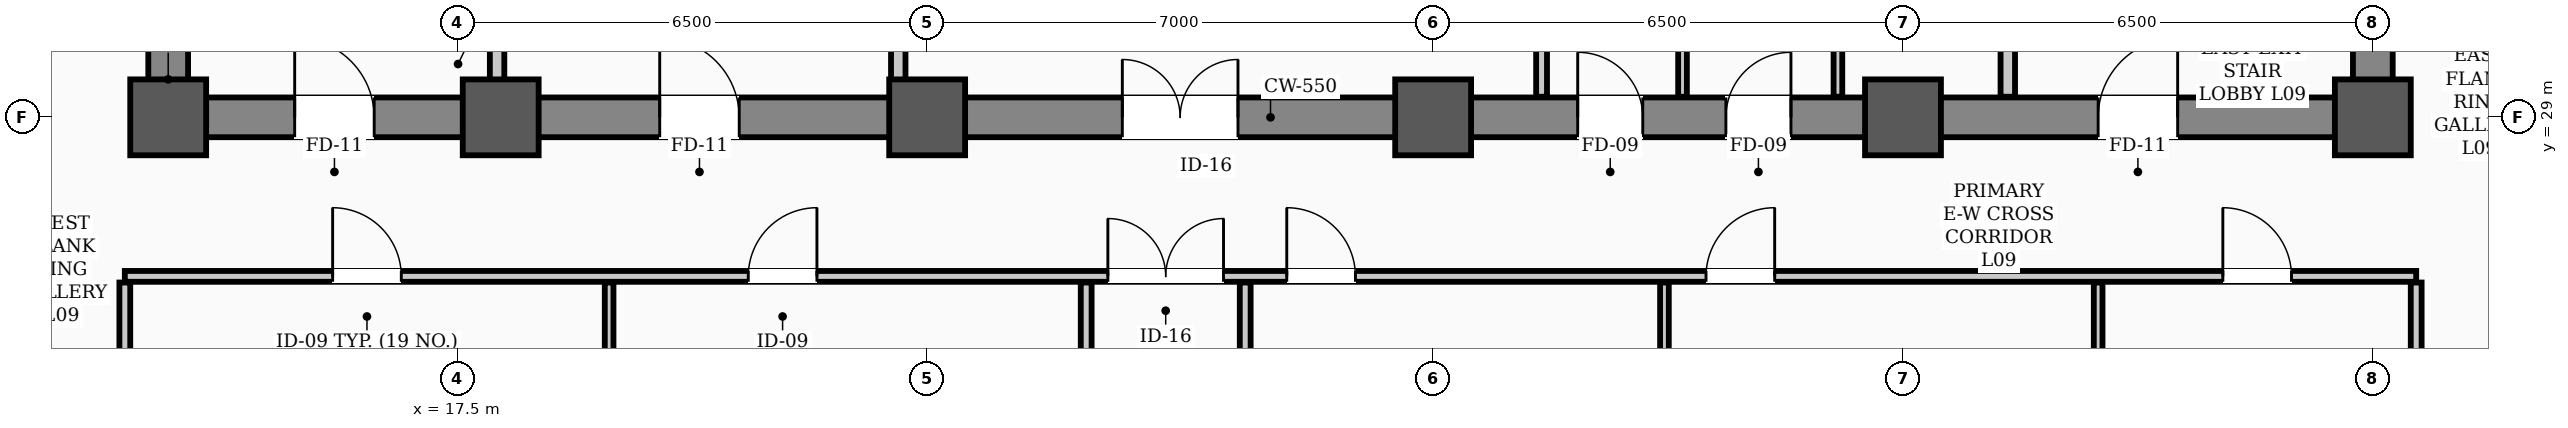
"""IFC4 building model, lengths in metres.
Left out: names, types, materials, properties, quantities, classifications, styles, units other than length and angle.
Written with IfcOpenShell. Run it as: python <this file> out.ifc"""

import sys

from ifc_helpers import new_model, si_unit, direction, frame, frame_2d, origin, origin_2d, place, context, subcontext, project, spatial, rectangle, hollow_rectangle, extrude, element, fill, save


model = new_model("IFC4")
c1 = context("Model", 3, precision=1e-05, world=origin(), true_north=direction((0.0, 1.0)))
c2 = subcontext(c1, "Body", "Model", "MODEL_VIEW")
j1 = project(units=[si_unit("LENGTHUNIT", "METRE"), si_unit("PLANEANGLEUNIT", "RADIAN")], contexts=[c1])
p1 = place(None, origin())
s1 = spatial("IfcSite", under=j1, at=p1, CompositionType="ELEMENT")
p2 = place(p1, origin())
s2 = spatial("IfcBuilding", under=s1, at=p2, CompositionType="ELEMENT")
p3 = place(p2, frame((0.0, 0.0, 38.2)))
s3 = spatial("IfcBuildingStorey", under=s2, at=p3, CompositionType="ELEMENT", Elevation=38.2)
for number, where, z_axis, x_axis in (
    (1, (13.5, 29.0, 0.0), (0.0, 0.0, 1.0), (1.0, 0.0, 0.0)),
    (2, (18.1, 29.0, 0.0), (0.0, 0.0, 1.0), (1.0, 0.0, 0.0)),
    (3, (24.0, 29.0, 0.0), (0.0, 0.0, 1.0), (1.0, 0.0, 0.0)),
    (4, (31.0, 29.0, 0.0), (0.0, 0.0, 1.0), (1.0, 0.0, 0.0)),
    (5, (37.5, 29.0, 0.0), (0.0, 0.0, 1.0), (1.0, 0.0, 0.0)),
    (6, (44.0, 29.0, 0.0), (0.0, 0.0, 1.0), (1.0, 0.0, 0.0)),
):
    element("IfcColumn", number, at=place(p3, frame(where, z_axis=z_axis, x_axis=x_axis)), inside=s3, PredefinedType="COLUMN", context=c2, shape_type="SweptSolid", body=[
        extrude(hollow_rectangle(XDim=1.05, YDim=1.05, WallThickness=0.038, InnerFilletRadius=0.019, OuterFilletRadius=0.057, at=origin_2d()), origin(), (0.0, 0.0, 1.0), 3.9),
    ])
p4 = place(p3, frame((13.5, 29.0, 0.0), z_axis=(0.0, 0.0, 1.0), x_axis=(1.0, 0.0, 0.0)))
e7 = element("IfcWall", 7, at=p4, inside=s3, PredefinedType="SHEAR", context=c2, shape_type="SweptSolid", body=[
    extrude(rectangle(XDim=30.5, YDim=0.55, at=frame_2d((15.25, 0.0))), origin(), (0.0, 0.0, 1.0), 3.72),
])
p5 = place(p4, frame((1.75, 0.0, 0.0)))
e8 = element("IfcOpeningElement", 8, at=p5, cuts=e7, PredefinedType="OPENING", context=c2, shape_type="SweptSolid", body=[
    extrude(rectangle(XDim=1.1, YDim=2.08, at=frame_2d((0.55, 1.04))), frame((0.0, 0.285, 0.0), z_axis=(0.0, -1.0, 0.0), x_axis=(1.0, 0.0, 0.0)), (0.0, 0.0, 1.0), 0.57),
])
p6 = place(p4, frame((26.7, 0.0, 0.0)))
e9 = element("IfcOpeningElement", 9, at=p6, cuts=e7, PredefinedType="OPENING", context=c2, shape_type="SweptSolid", body=[
    extrude(rectangle(XDim=1.1, YDim=2.08, at=frame_2d((0.55, 1.04))), frame((0.0, 0.285, 0.0), z_axis=(0.0, -1.0, 0.0), x_axis=(1.0, 0.0, 0.0)), (0.0, 0.0, 1.0), 0.57),
])
p7 = place(p4, frame((6.8, 0.0, 0.0)))
e10 = element("IfcOpeningElement", 10, at=p7, cuts=e7, PredefinedType="OPENING", context=c2, shape_type="SweptSolid", body=[
    extrude(rectangle(XDim=1.1, YDim=2.08, at=frame_2d((0.55, 1.04))), frame((0.0, 0.285, 0.0), z_axis=(0.0, -1.0, 0.0), x_axis=(1.0, 0.0, 0.0)), (0.0, 0.0, 1.0), 0.57),
])
p8 = place(p4, frame((13.2, 0.0, 0.0)))
e11 = element("IfcOpeningElement", 11, at=p8, cuts=e7, PredefinedType="OPENING", context=c2, shape_type="SweptSolid", body=[
    extrude(rectangle(XDim=1.6, YDim=2.08, at=frame_2d((0.8, 1.04))), frame((0.0, 0.285, 0.0), z_axis=(0.0, -1.0, 0.0), x_axis=(1.0, 0.0, 0.0)), (0.0, 0.0, 1.0), 0.57),
])
p9 = place(p4, frame((19.5, 0.0, 0.0)))
e12 = element("IfcOpeningElement", 12, at=p9, cuts=e7, PredefinedType="OPENING", context=c2, shape_type="SweptSolid", body=[
    extrude(rectangle(XDim=0.9, YDim=2.08, at=frame_2d((0.45, 1.04))), frame((0.0, 0.285, 0.0), z_axis=(0.0, -1.0, 0.0), x_axis=(1.0, 0.0, 0.0)), (0.0, 0.0, 1.0), 0.57),
])
p10 = place(p4, frame((21.55, 0.0, 0.0)))
e13 = element("IfcOpeningElement", 13, at=p10, cuts=e7, PredefinedType="OPENING", context=c2, shape_type="SweptSolid", body=[
    extrude(rectangle(XDim=0.9, YDim=2.08, at=frame_2d((0.45, 1.04))), frame((0.0, 0.285, 0.0), z_axis=(0.0, -1.0, 0.0), x_axis=(1.0, 0.0, 0.0)), (0.0, 0.0, 1.0), 0.57),
])
for number, where, z_axis, x_axis in (
    (14, (13.5, 29.35, 0.0), (0.0, 0.0, 1.0), (0.0, 1.0, 0.0)),
    (15, (44.0, 29.35, 0.0), (0.0, 0.0, 1.0), (0.0, 1.0, 0.0)),
):
    element("IfcWall", number, at=place(p3, frame(where, z_axis=z_axis, x_axis=x_axis)), inside=s3, PredefinedType="SHEAR", context=c2, shape_type="SweptSolid", body=[
        extrude(rectangle(XDim=8.6, YDim=0.55, at=frame_2d((4.3, 0.0))), origin(), (0.0, 0.0, 1.0), 3.72),
    ])
p11 = place(p3, frame((12.9, 26.8, 0.0), z_axis=(0.0, 0.0, 1.0), x_axis=(1.0, 0.0, 0.0)))
e16 = element("IfcWall", 16, at=p11, inside=s3, PredefinedType="PARTITIONING", context=c2, shape_type="SweptSolid", body=[
    extrude(rectangle(XDim=31.7, YDim=0.15, at=frame_2d((15.85, 0.0))), origin(), (0.0, 0.0, 1.0), 3.1),
])
p12 = place(p11, frame((13.6, 0.0, 0.0)))
e17 = element("IfcOpeningElement", 17, at=p12, cuts=e16, PredefinedType="OPENING", context=c2, shape_type="SweptSolid", body=[
    extrude(rectangle(XDim=1.6, YDim=2.08, at=frame_2d((0.8, 1.04))), frame((0.0, 0.085, 0.0), z_axis=(0.0, -1.0, 0.0), x_axis=(1.0, 0.0, 0.0)), (0.0, 0.0, 1.0), 0.17),
])
p13 = place(p11, frame((2.875, 0.0, 0.0)))
e18 = element("IfcOpeningElement", 18, at=p13, cuts=e16, PredefinedType="OPENING", context=c2, shape_type="SweptSolid", body=[
    extrude(rectangle(XDim=0.95, YDim=2.08, at=frame_2d((0.475, 1.04))), frame((0.0, 0.085, 0.0), z_axis=(0.0, -1.0, 0.0), x_axis=(1.0, 0.0, 0.0)), (0.0, 0.0, 1.0), 0.17),
])
p14 = place(p11, frame((8.625, 0.0, 0.0)))
e19 = element("IfcOpeningElement", 19, at=p14, cuts=e16, PredefinedType="OPENING", context=c2, shape_type="SweptSolid", body=[
    extrude(rectangle(XDim=0.95, YDim=2.08, at=frame_2d((0.475, 1.04))), frame((0.0, 0.085, 0.0), z_axis=(0.0, -1.0, 0.0), x_axis=(1.0, 0.0, 0.0)), (0.0, 0.0, 1.0), 0.17),
])
p15 = place(p11, frame((16.075, 0.0, 0.0)))
e20 = element("IfcOpeningElement", 20, at=p15, cuts=e16, PredefinedType="OPENING", context=c2, shape_type="SweptSolid", body=[
    extrude(rectangle(XDim=0.95, YDim=2.08, at=frame_2d((0.475, 1.04))), frame((0.0, 0.085, 0.0), z_axis=(0.0, -1.0, 0.0), x_axis=(1.0, 0.0, 0.0)), (0.0, 0.0, 1.0), 0.17),
])
p16 = place(p11, frame((21.875, 0.0, 0.0)))
e21 = element("IfcOpeningElement", 21, at=p16, cuts=e16, PredefinedType="OPENING", context=c2, shape_type="SweptSolid", body=[
    extrude(rectangle(XDim=0.95, YDim=2.08, at=frame_2d((0.475, 1.04))), frame((0.0, 0.085, 0.0), z_axis=(0.0, -1.0, 0.0), x_axis=(1.0, 0.0, 0.0)), (0.0, 0.0, 1.0), 0.17),
])
p17 = place(p11, frame((29.025, 0.0, 0.0)))
e22 = element("IfcOpeningElement", 22, at=p17, cuts=e16, PredefinedType="OPENING", context=c2, shape_type="SweptSolid", body=[
    extrude(rectangle(XDim=0.95, YDim=2.08, at=frame_2d((0.475, 1.04))), frame((0.0, 0.085, 0.0), z_axis=(0.0, -1.0, 0.0), x_axis=(1.0, 0.0, 0.0)), (0.0, 0.0, 1.0), 0.17),
])
for number, where, z_axis, x_axis in (
    (23, (18.05, 29.285, 0.0), (0.0, 0.0, 1.0), (0.0, 1.0, 0.0)),
    (24, (38.95, 29.285, 0.0), (0.0, 0.0, 1.0), (0.0, 1.0, 0.0)),
):
    element("IfcWall", number, at=place(p3, frame(where, z_axis=z_axis, x_axis=x_axis)), inside=s3, PredefinedType="STANDARD", context=c2, shape_type="SweptSolid", body=[
        extrude(rectangle(XDim=1.015, YDim=0.2, at=frame_2d((0.508, 0.0))), origin(), (0.0, 0.0, 1.0), 3.3),
    ])
p18 = place(p3, frame((23.6, 29.285, 0.0), z_axis=(0.0, 0.0, 1.0), x_axis=(0.0, 1.0, 0.0)))
e25 = element("IfcWall", 25, at=p18, inside=s3, PredefinedType="STANDARD", context=c2, shape_type="SweptSolid", body=[
    extrude(rectangle(XDim=5.415, YDim=0.2, at=frame_2d((2.708, 0.0))), origin(), (0.0, 0.0, 1.0), 3.1),
])
p19 = place(p3, frame((32.5, 29.285, 0.0), z_axis=(0.0, 0.0, 1.0), x_axis=(0.0, 1.0, 0.0)))
e26 = element("IfcWall", 26, at=p19, inside=s3, PredefinedType="PARTITIONING", context=c2, shape_type="SweptSolid", body=[
    extrude(rectangle(XDim=2.48, YDim=0.15, at=frame_2d((1.24, 0.0))), origin(), (0.0, 0.0, 1.0), 3.3),
])
for number, where, z_axis, x_axis in (
    (27, (36.6, 29.285, 0.0), (0.0, 0.0, 1.0), (0.0, 1.0, 0.0)),
    (28, (34.45, 29.285, 0.0), (0.0, 0.0, 1.0), (0.0, 1.0, 0.0)),
):
    element("IfcWall", number, at=place(p3, frame(where, z_axis=z_axis, x_axis=x_axis)), inside=s3, PredefinedType="PARTITIONING", context=c2, shape_type="SweptSolid", body=[
        extrude(rectangle(XDim=2.48, YDim=0.12, at=frame_2d((1.24, 0.0))), origin(), (0.0, 0.0, 1.0), 3.3),
    ])
for number, where, z_axis, x_axis in (
    (29, (26.2, 19.335, 0.0), (0.0, 0.0, 1.0), (0.0, 1.0, 0.0)),
    (30, (28.4, 19.335, 0.0), (0.0, 0.0, 1.0), (0.0, 1.0, 0.0)),
    (31, (12.9, 19.335, 0.0), (0.0, 0.0, 1.0), (0.0, 1.0, 0.0)),
    (32, (44.6, 19.335, 0.0), (0.0, 0.0, 1.0), (0.0, 1.0, 0.0)),
):
    element("IfcWall", number, at=place(p3, frame(where, z_axis=z_axis, x_axis=x_axis)), inside=s3, PredefinedType="PARTITIONING", context=c2, shape_type="SweptSolid", body=[
        extrude(rectangle(XDim=7.38, YDim=0.15, at=frame_2d((3.69, 0.0))), origin(), (0.0, 0.0, 1.0), 3.0),
    ])
for number, where, z_axis, x_axis in (
    (33, (19.6, 19.335, 0.0), (0.0, 0.0, 1.0), (0.0, 1.0, 0.0)),
    (34, (34.2, 19.335, 0.0), (0.0, 0.0, 1.0), (0.0, 1.0, 0.0)),
    (35, (40.2, 19.335, 0.0), (0.0, 0.0, 1.0), (0.0, 1.0, 0.0)),
):
    element("IfcWall", number, at=place(p3, frame(where, z_axis=z_axis, x_axis=x_axis)), inside=s3, PredefinedType="PARTITIONING", context=c2, shape_type="SweptSolid", body=[
        extrude(rectangle(XDim=7.38, YDim=0.12, at=frame_2d((3.69, 0.0))), origin(), (0.0, 0.0, 1.0), 3.0),
    ])
p20 = place(p5, origin())
e36 = element("IfcDoor", 36, at=p20, inside=s3, OperationType="SINGLE_SWING_LEFT", PredefinedType="DOOR", context=c2, shape_type="SweptSolid", body=[
    extrude(rectangle(XDim=1.1, YDim=2.08, at=frame_2d((0.55, 1.04))), frame((0.0, 0.025, 0.0), z_axis=(0.0, -1.0, 0.0), x_axis=(1.0, 0.0, 0.0)), (0.0, 0.0, 1.0), 0.05),
])
fill(e8, e36)
p21 = place(p6, origin())
e37 = element("IfcDoor", 37, at=p21, inside=s3, OperationType="SINGLE_SWING_RIGHT", PredefinedType="DOOR", context=c2, shape_type="SweptSolid", body=[
    extrude(rectangle(XDim=1.1, YDim=2.08, at=frame_2d((0.55, 1.04))), frame((0.0, 0.025, 0.0), z_axis=(0.0, -1.0, 0.0), x_axis=(1.0, 0.0, 0.0)), (0.0, 0.0, 1.0), 0.05),
])
fill(e9, e37)
p22 = place(p7, origin())
e38 = element("IfcDoor", 38, at=p22, inside=s3, OperationType="SINGLE_SWING_LEFT", PredefinedType="DOOR", context=c2, shape_type="SweptSolid", body=[
    extrude(rectangle(XDim=1.1, YDim=2.08, at=frame_2d((0.55, 1.04))), frame((0.0, 0.025, 0.0), z_axis=(0.0, -1.0, 0.0), x_axis=(1.0, 0.0, 0.0)), (0.0, 0.0, 1.0), 0.05),
])
fill(e10, e38)
p23 = place(p8, origin())
e39 = element("IfcDoor", 39, at=p23, inside=s3, OperationType="DOUBLE_DOOR_SINGLE_SWING", PredefinedType="DOOR", context=c2, shape_type="SweptSolid", body=[
    extrude(rectangle(XDim=1.6, YDim=2.08, at=frame_2d((0.8, 1.04))), frame((0.0, 0.025, 0.0), z_axis=(0.0, -1.0, 0.0), x_axis=(1.0, 0.0, 0.0)), (0.0, 0.0, 1.0), 0.05),
])
fill(e11, e39)
p24 = place(p9, origin())
e40 = element("IfcDoor", 40, at=p24, inside=s3, OperationType="SINGLE_SWING_LEFT", PredefinedType="DOOR", context=c2, shape_type="SweptSolid", body=[
    extrude(rectangle(XDim=0.9, YDim=2.08, at=frame_2d((0.45, 1.04))), frame((0.0, 0.025, 0.0), z_axis=(0.0, -1.0, 0.0), x_axis=(1.0, 0.0, 0.0)), (0.0, 0.0, 1.0), 0.05),
])
fill(e12, e40)
p25 = place(p10, origin())
e41 = element("IfcDoor", 41, at=p25, inside=s3, OperationType="SINGLE_SWING_RIGHT", PredefinedType="DOOR", context=c2, shape_type="SweptSolid", body=[
    extrude(rectangle(XDim=0.9, YDim=2.08, at=frame_2d((0.45, 1.04))), frame((0.0, 0.025, 0.0), z_axis=(0.0, -1.0, 0.0), x_axis=(1.0, 0.0, 0.0)), (0.0, 0.0, 1.0), 0.05),
])
fill(e13, e41)
p26 = place(p12, origin())
e42 = element("IfcDoor", 42, at=p26, inside=s3, OperationType="DOUBLE_DOOR_SINGLE_SWING", PredefinedType="DOOR", context=c2, shape_type="SweptSolid", body=[
    extrude(rectangle(XDim=1.6, YDim=2.08, at=frame_2d((0.8, 1.04))), frame((0.0, 0.025, 0.0), z_axis=(0.0, -1.0, 0.0), x_axis=(1.0, 0.0, 0.0)), (0.0, 0.0, 1.0), 0.05),
])
fill(e17, e42)
p27 = place(p13, origin())
e43 = element("IfcDoor", 43, at=p27, inside=s3, OperationType="SINGLE_SWING_LEFT", PredefinedType="DOOR", context=c2, shape_type="SweptSolid", body=[
    extrude(rectangle(XDim=0.95, YDim=2.08, at=frame_2d((0.475, 1.04))), frame((0.0, 0.025, 0.0), z_axis=(0.0, -1.0, 0.0), x_axis=(1.0, 0.0, 0.0)), (0.0, 0.0, 1.0), 0.05),
])
fill(e18, e43)
p28 = place(p14, origin())
e44 = element("IfcDoor", 44, at=p28, inside=s3, OperationType="SINGLE_SWING_RIGHT", PredefinedType="DOOR", context=c2, shape_type="SweptSolid", body=[
    extrude(rectangle(XDim=0.95, YDim=2.08, at=frame_2d((0.475, 1.04))), frame((0.0, 0.025, 0.0), z_axis=(0.0, -1.0, 0.0), x_axis=(1.0, 0.0, 0.0)), (0.0, 0.0, 1.0), 0.05),
])
fill(e19, e44)
p29 = place(p15, origin())
e45 = element("IfcDoor", 45, at=p29, inside=s3, OperationType="SINGLE_SWING_LEFT", PredefinedType="DOOR", context=c2, shape_type="SweptSolid", body=[
    extrude(rectangle(XDim=0.95, YDim=2.08, at=frame_2d((0.475, 1.04))), frame((0.0, 0.025, 0.0), z_axis=(0.0, -1.0, 0.0), x_axis=(1.0, 0.0, 0.0)), (0.0, 0.0, 1.0), 0.05),
])
fill(e20, e45)
p30 = place(p16, origin())
e46 = element("IfcDoor", 46, at=p30, inside=s3, OperationType="SINGLE_SWING_RIGHT", PredefinedType="DOOR", context=c2, shape_type="SweptSolid", body=[
    extrude(rectangle(XDim=0.95, YDim=2.08, at=frame_2d((0.475, 1.04))), frame((0.0, 0.025, 0.0), z_axis=(0.0, -1.0, 0.0), x_axis=(1.0, 0.0, 0.0)), (0.0, 0.0, 1.0), 0.05),
])
fill(e21, e46)
p31 = place(p17, origin())
e47 = element("IfcDoor", 47, at=p31, inside=s3, OperationType="SINGLE_SWING_LEFT", PredefinedType="DOOR", context=c2, shape_type="SweptSolid", body=[
    extrude(rectangle(XDim=0.95, YDim=2.08, at=frame_2d((0.475, 1.04))), frame((0.0, 0.025, 0.0), z_axis=(0.0, -1.0, 0.0), x_axis=(1.0, 0.0, 0.0)), (0.0, 0.0, 1.0), 0.05),
])
fill(e22, e47)
save(model, sys.argv[1])
